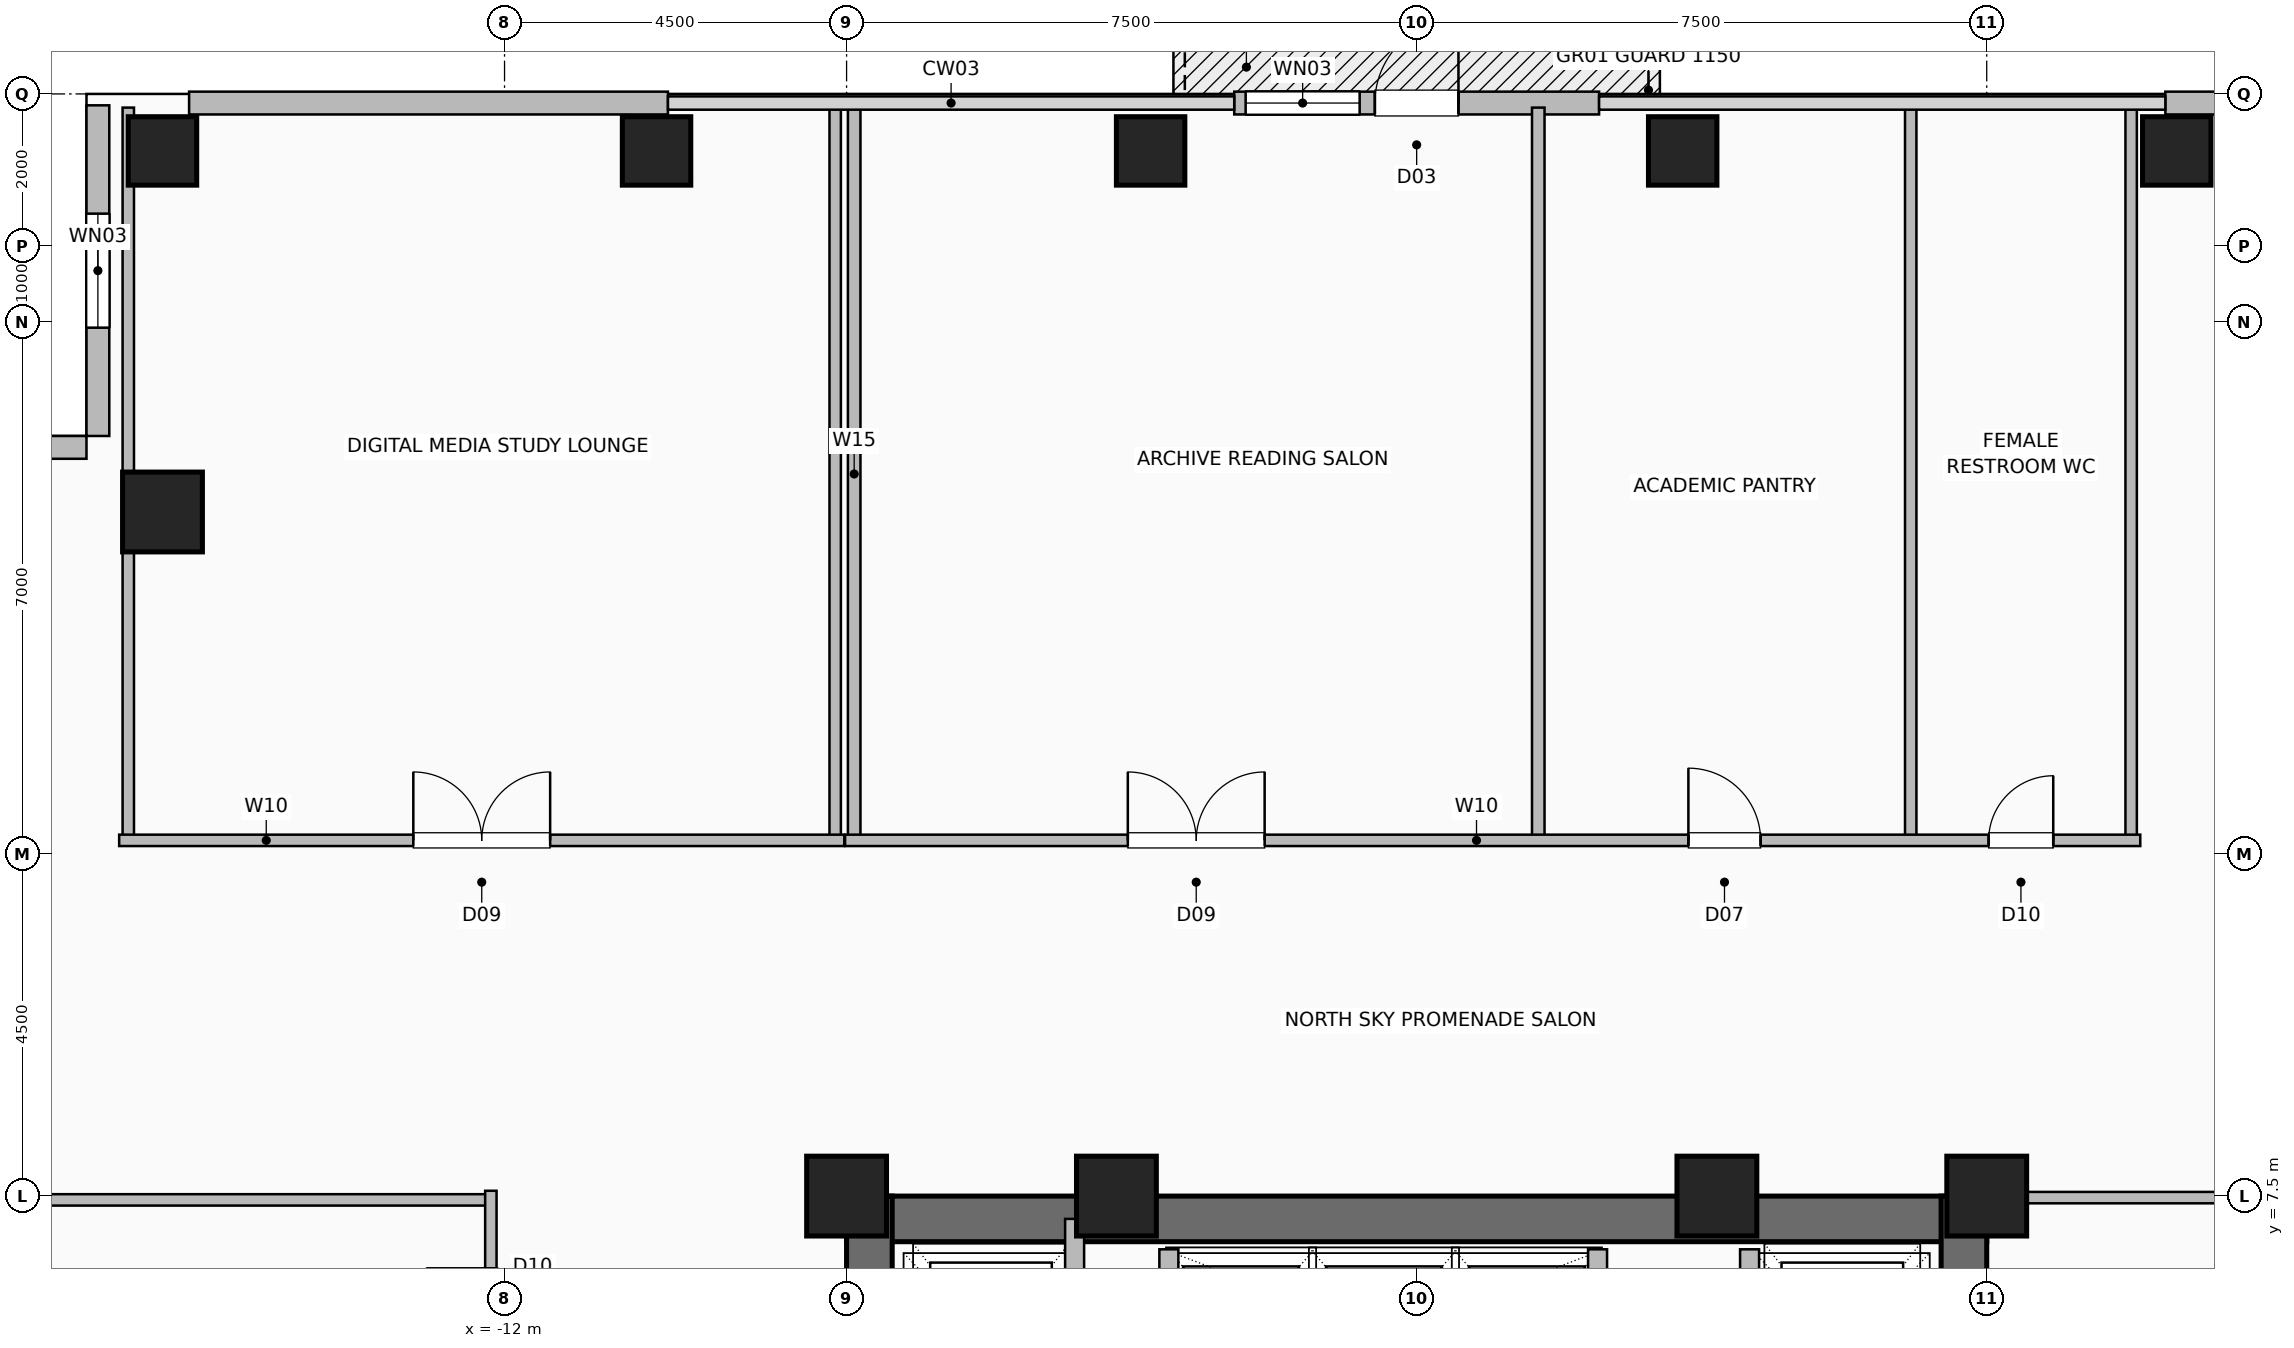
"""IFC4 building model, lengths in metres.
Left out: names, types, materials, properties, quantities, classifications, styles, units other than length and angle.
Written with IfcOpenShell. Run it as: python <this file> out.ifc"""

import sys

from ifc_helpers import new_model, si_unit, direction, frame, frame_2d, origin, origin_2d, place, context, subcontext, project, spatial, rectangle, hollow_rectangle, extrude, element, fill, save


model = new_model("IFC4")
c1 = context("Model", 3, precision=1e-05, world=origin(), true_north=direction((0.0, 1.0)))
c2 = subcontext(c1, "Body", "Model", "MODEL_VIEW")
j1 = project(units=[si_unit("LENGTHUNIT", "METRE"), si_unit("PLANEANGLEUNIT", "RADIAN")], contexts=[c1])
p1 = place(None, origin())
s1 = spatial("IfcSite", under=j1, at=p1, CompositionType="ELEMENT")
p2 = place(p1, origin())
s2 = spatial("IfcBuilding", under=s1, at=p2, CompositionType="ELEMENT")
p3 = place(p2, frame((0.0, 0.0, 133.6)))
s3 = spatial("IfcBuildingStorey", under=s2, at=p3, CompositionType="ELEMENT", Elevation=133.6)
for number, where, z_axis, x_axis in (
    (1, (7.5, 7.5, 0.0), (0.0, 0.0, 1.0), (1.0, 0.0, 0.0)),
    (2, (3.95, 7.5, 0.0), (0.0, 0.0, 1.0), (1.0, 0.0, 0.0)),
    (3, (-3.95, 7.5, 0.0), (0.0, 0.0, 1.0), (1.0, 0.0, 0.0)),
    (4, (-7.5, 7.5, 0.0), (0.0, 0.0, 1.0), (1.0, 0.0, 0.0)),
):
    element("IfcColumn", number, at=place(p3, frame(where, z_axis=z_axis, x_axis=x_axis)), inside=s3, PredefinedType="COLUMN", context=c2, shape_type="SweptSolid", body=[
        extrude(hollow_rectangle(XDim=1.05, YDim=1.05, WallThickness=0.05, at=origin_2d()), origin(), (0.0, 0.0, 1.0), 3.6),
    ])
for number, where, z_axis, x_axis in (
    (5, (-16.5, 21.25, 0.0), (0.0, 0.0, 1.0), (1.0, 0.0, 0.0)),
    (6, (-10.0, 21.25, 0.0), (0.0, 0.0, 1.0), (1.0, 0.0, 0.0)),
    (7, (-3.5, 21.25, 0.0), (0.0, 0.0, 1.0), (1.0, 0.0, 0.0)),
    (8, (3.5, 21.25, 0.0), (0.0, 0.0, 1.0), (1.0, 0.0, 0.0)),
    (9, (10.0, 21.25, 0.0), (0.0, 0.0, 1.0), (1.0, 0.0, 0.0)),
):
    element("IfcColumn", number, at=place(p3, frame(where, z_axis=z_axis, x_axis=x_axis)), inside=s3, PredefinedType="COLUMN", context=c2, shape_type="SweptSolid", body=[
        extrude(hollow_rectangle(XDim=0.9, YDim=0.9, WallThickness=0.045, at=origin_2d()), origin(), (0.0, 0.0, 1.0), 3.6),
    ])
p4 = place(p3, frame((-16.5, 16.5, 0.0), z_axis=(0.0, 0.0, 1.0), x_axis=(1.0, 0.0, 0.0)))
e10 = element("IfcColumn", 10, at=p4, inside=s3, PredefinedType="COLUMN", context=c2, shape_type="SweptSolid", body=[
    extrude(hollow_rectangle(XDim=1.05, YDim=1.05, WallThickness=0.05, at=origin_2d()), origin(), (0.0, 0.0, 1.0), 3.6),
])
for number, where, z_axis, x_axis in (
    (11, (-16.15, 21.88, 0.0), (0.0, 0.0, 1.0), (1.0, 0.0, 0.0)),
    (12, (9.85, 21.88, 0.0), (0.0, 0.0, 1.0), (1.0, 0.0, 0.0)),
):
    element("IfcWall", number, at=place(p3, frame(where, z_axis=z_axis, x_axis=x_axis)), inside=s3, PredefinedType="SOLIDWALL", context=c2, shape_type="SweptSolid", body=[
        extrude(rectangle(XDim=6.3, YDim=0.3, at=frame_2d((3.15, 0.0))), origin(), (0.0, 0.0, 1.0), 3.36),
    ])
p5 = place(p3, frame((-2.4, 21.88, 0.0), z_axis=(0.0, 0.0, 1.0), x_axis=(1.0, 0.0, 0.0)))
e13 = element("IfcWall", 13, at=p5, inside=s3, PredefinedType="SOLIDWALL", context=c2, shape_type="SweptSolid", body=[
    extrude(rectangle(XDim=4.8, YDim=0.3, at=frame_2d((2.4, 0.0))), origin(), (0.0, 0.0, 1.0), 3.36),
])
p6 = place(p5, frame((1.85, 0.0, 0.0)))
e14 = element("IfcOpeningElement", 14, at=p6, cuts=e13, PredefinedType="OPENING", context=c2, shape_type="SweptSolid", body=[
    extrude(rectangle(XDim=1.1, YDim=2.2, at=frame_2d((0.55, 1.1))), frame((0.0, 0.16, 0.0), z_axis=(0.0, -1.0, 0.0), x_axis=(1.0, 0.0, 0.0)), (0.0, 0.0, 1.0), 0.32),
])
p7 = place(p5, frame((0.15, 0.0, 0.85)))
e15 = element("IfcOpeningElement", 15, at=p7, cuts=e13, PredefinedType="OPENING", context=c2, shape_type="SweptSolid", body=[
    extrude(rectangle(XDim=1.5, YDim=1.8, at=frame_2d((0.75, 0.9))), frame((0.0, 0.16, 0.0), z_axis=(0.0, -1.0, 0.0), x_axis=(1.0, 0.0, 0.0)), (0.0, 0.0, 1.0), 0.32),
])
p8 = place(p3, frame((-17.35, 21.85, 0.0), z_axis=(0.0, 0.0, 1.0), x_axis=(0.0, -1.0, 0.0)))
e16 = element("IfcWall", 16, at=p8, inside=s3, PredefinedType="SOLIDWALL", context=c2, shape_type="SweptSolid", body=[
    extrude(rectangle(XDim=4.35, YDim=0.3, at=frame_2d((2.175, 0.0))), origin(), (0.0, 0.0, 1.0), 3.36),
])
p9 = place(p8, frame((1.425, 0.0, 0.9)))
e17 = element("IfcOpeningElement", 17, at=p9, cuts=e16, PredefinedType="OPENING", context=c2, shape_type="SweptSolid", body=[
    extrude(rectangle(XDim=1.5, YDim=1.8, at=frame_2d((0.75, 0.9))), frame((0.0, 0.16, 0.0), z_axis=(0.0, -1.0, 0.0), x_axis=(1.0, 0.0, 0.0)), (0.0, 0.0, 1.0), 0.32),
])
p10 = place(p3, frame((-21.85, 17.35, 0.0), z_axis=(0.0, 0.0, 1.0), x_axis=(1.0, 0.0, 0.0)))
e18 = element("IfcWall", 18, at=p10, inside=s3, PredefinedType="SOLIDWALL", context=c2, shape_type="SweptSolid", body=[
    extrude(rectangle(XDim=4.35, YDim=0.3, at=frame_2d((2.175, 0.0))), origin(), (0.0, 0.0, 1.0), 3.36),
])
p11 = place(p3, frame((-7.5, 7.2, 0.0), z_axis=(0.0, 0.0, 1.0), x_axis=(1.0, 0.0, 0.0)))
e19 = element("IfcWall", 19, at=p11, inside=s3, PredefinedType="SHEAR", context=c2, shape_type="SweptSolid", body=[
    extrude(rectangle(XDim=15.0, YDim=0.6, at=frame_2d((7.5, 0.0))), origin(), (0.0, 0.0, 1.0), 3.36),
])
p12 = place(p3, frame((-7.2, -7.5, 0.0), z_axis=(0.0, 0.0, 1.0), x_axis=(0.0, 1.0, 0.0)))
e20 = element("IfcWall", 20, at=p12, inside=s3, PredefinedType="SHEAR", context=c2, shape_type="SweptSolid", body=[
    extrude(rectangle(XDim=15.0, YDim=0.6, at=frame_2d((7.5, 0.0))), origin(), (0.0, 0.0, 1.0), 3.36),
])
p13 = place(p12, frame((9.5, 0.0, 0.0)))
e21 = element("IfcOpeningElement", 21, at=p13, cuts=e20, PredefinedType="OPENING", context=c2, shape_type="SweptSolid", body=[
    extrude(rectangle(XDim=1.0, YDim=2.08, at=frame_2d((0.5, 1.04))), frame((0.0, 0.31, 0.0), z_axis=(0.0, -1.0, 0.0), x_axis=(1.0, 0.0, 0.0)), (0.0, 0.0, 1.0), 0.62),
])
p14 = place(p3, frame((7.2, -7.5, 0.0), z_axis=(0.0, 0.0, 1.0), x_axis=(0.0, 1.0, 0.0)))
e22 = element("IfcWall", 22, at=p14, inside=s3, PredefinedType="SHEAR", context=c2, shape_type="SweptSolid", body=[
    extrude(rectangle(XDim=15.0, YDim=0.6, at=frame_2d((7.5, 0.0))), origin(), (0.0, 0.0, 1.0), 3.36),
])
for number, where, z_axis, x_axis in (
    (23, (-3.26, 4.58, 0.0), (0.0, 0.0, 1.0), (0.0, 1.0, 0.0)),
    (24, (2.38, 4.58, 0.0), (0.0, 0.0, 1.0), (0.0, 1.0, 0.0)),
):
    element("IfcWall", number, at=place(p3, frame(where, z_axis=z_axis, x_axis=x_axis)), inside=s3, PredefinedType="SHEAR", context=c2, shape_type="SweptSolid", body=[
        extrude(rectangle(XDim=2.22, YDim=0.25, at=frame_2d((1.11, 0.0))), origin(), (0.0, 0.0, 1.0), 3.36),
    ])
p15 = place(p3, frame((-4.5, 4.35, 0.0), z_axis=(0.0, 0.0, 1.0), x_axis=(0.0, 1.0, 0.0)))
e25 = element("IfcWall", 25, at=p15, inside=s3, PredefinedType="SHEAR", context=c2, shape_type="SweptSolid", body=[
    extrude(rectangle(XDim=2.85, YDim=0.25, at=frame_2d((1.425, 0.0))), origin(), (0.0, 0.0, 1.0), 3.36),
])
p16 = place(p3, frame((4.38, 4.3, 0.0), z_axis=(0.0, 0.0, 1.0), x_axis=(0.0, 1.0, 0.0)))
e26 = element("IfcWall", 26, at=p16, inside=s3, PredefinedType="SHEAR", context=c2, shape_type="SweptSolid", body=[
    extrude(rectangle(XDim=2.5, YDim=0.25, at=frame_2d((1.25, 0.0))), origin(), (0.0, 0.0, 1.0), 3.36),
])
p17 = place(p16, frame((0.8, 0.0, 0.0)))
e27 = element("IfcOpeningElement", 27, at=p17, cuts=e26, PredefinedType="OPENING", context=c2, shape_type="SweptSolid", body=[
    extrude(rectangle(XDim=1.2, YDim=2.2, at=frame_2d((0.6, 1.1))), frame((0.0, 0.135, 0.0), z_axis=(0.0, -1.0, 0.0), x_axis=(1.0, 0.0, 0.0)), (0.0, 0.0, 1.0), 0.27),
])
p18 = place(p3, frame((-21.82, 7.45, 0.0), z_axis=(0.0, 0.0, 1.0), x_axis=(1.0, 0.0, 0.0)))
e28 = element("IfcWall", 28, at=p18, inside=s3, PredefinedType="PARTITIONING", context=c2, shape_type="SweptSolid", body=[
    extrude(rectangle(XDim=9.64, YDim=0.15, at=frame_2d((4.82, 0.0))), origin(), (0.0, 0.0, 1.0), 3.36),
])
p19 = place(p3, frame((-12.18, -7.57, 0.0), z_axis=(0.0, 0.0, 1.0), x_axis=(0.0, 1.0, 0.0)))
e29 = element("IfcWall", 29, at=p19, inside=s3, PredefinedType="PARTITIONING", context=c2, shape_type="SweptSolid", body=[
    extrude(rectangle(XDim=15.14, YDim=0.15, at=frame_2d((7.57, 0.0))), origin(), (0.0, 0.0, 1.0), 3.36),
])
p20 = place(p19, frame((2.27, 0.0, 0.0)))
e30 = element("IfcOpeningElement", 30, at=p20, cuts=e29, PredefinedType="OPENING", context=c2, shape_type="SweptSolid", body=[
    extrude(rectangle(XDim=0.95, YDim=2.06, at=frame_2d((0.475, 1.03))), frame((0.0, 0.085, 0.0), z_axis=(0.0, -1.0, 0.0), x_axis=(1.0, 0.0, 0.0)), (0.0, 0.0, 1.0), 0.17),
])
p21 = place(p19, frame((8.395, 0.0, 0.0)))
e31 = element("IfcOpeningElement", 31, at=p21, cuts=e29, PredefinedType="OPENING", context=c2, shape_type="SweptSolid", body=[
    extrude(rectangle(XDim=0.95, YDim=2.06, at=frame_2d((0.475, 1.03))), frame((0.0, 0.085, 0.0), z_axis=(0.0, -1.0, 0.0), x_axis=(1.0, 0.0, 0.0)), (0.0, 0.0, 1.0), 0.17),
])
p22 = place(p19, frame((13.27, 0.0, 0.0)))
e32 = element("IfcOpeningElement", 32, at=p22, cuts=e29, PredefinedType="OPENING", context=c2, shape_type="SweptSolid", body=[
    extrude(rectangle(XDim=0.85, YDim=2.05, at=frame_2d((0.425, 1.025))), frame((0.0, 0.085, 0.0), z_axis=(0.0, -1.0, 0.0), x_axis=(1.0, 0.0, 0.0)), (0.0, 0.0, 1.0), 0.17),
])
for number, where, z_axis, x_axis in (
    (33, (-16.95, 12.18, 0.0), (0.0, 0.0, 1.0), (0.0, 1.0, 0.0)),
    (34, (-7.65, 12.18, 0.0), (0.0, 0.0, 1.0), (0.0, 1.0, 0.0)),
):
    element("IfcWall", number, at=place(p3, frame(where, z_axis=z_axis, x_axis=x_axis)), inside=s3, PredefinedType="PARTITIONING", context=c2, shape_type="SweptSolid", body=[
        extrude(rectangle(XDim=9.64, YDim=0.15, at=frame_2d((4.82, 0.0))), origin(), (0.0, 0.0, 1.0), 3.36),
    ])
p23 = place(p3, frame((-17.07, 12.18, 0.0), z_axis=(0.0, 0.0, 1.0), x_axis=(1.0, 0.0, 0.0)))
e35 = element("IfcWall", 35, at=p23, inside=s3, PredefinedType="PARTITIONING", context=c2, shape_type="SweptSolid", body=[
    extrude(rectangle(XDim=9.54, YDim=0.15, at=frame_2d((4.77, 0.0))), origin(), (0.0, 0.0, 1.0), 3.36),
])
p24 = place(p23, frame((3.87, 0.0, 0.0)))
e36 = element("IfcOpeningElement", 36, at=p24, cuts=e35, PredefinedType="OPENING", context=c2, shape_type="SweptSolid", body=[
    extrude(rectangle(XDim=1.8, YDim=2.08, at=frame_2d((0.9, 1.04))), frame((0.0, 0.085, 0.0), z_axis=(0.0, -1.0, 0.0), x_axis=(1.0, 0.0, 0.0)), (0.0, 0.0, 1.0), 0.17),
])
for number, where, z_axis, x_axis in (
    (37, (-7.4, 12.18, 0.0), (0.0, 0.0, 1.0), (0.0, 1.0, 0.0)),
    (38, (1.6, 12.18, 0.0), (0.0, 0.0, 1.0), (0.0, 1.0, 0.0)),
):
    element("IfcWall", number, at=place(p3, frame(where, z_axis=z_axis, x_axis=x_axis)), inside=s3, PredefinedType="PLUMBINGWALL", context=c2, shape_type="SweptSolid", body=[
        extrude(rectangle(XDim=9.64, YDim=0.165, at=frame_2d((4.82, 0.0))), origin(), (0.0, 0.0, 1.0), 3.36),
    ])
for number, where, z_axis, x_axis in (
    (39, (6.5, 12.18, 0.0), (0.0, 0.0, 1.0), (0.0, 1.0, 0.0)),
    (40, (9.4, 12.18, 0.0), (0.0, 0.0, 1.0), (0.0, 1.0, 0.0)),
):
    element("IfcWall", number, at=place(p3, frame(where, z_axis=z_axis, x_axis=x_axis)), inside=s3, PredefinedType="PARTITIONING", context=c2, shape_type="SweptSolid", body=[
        extrude(rectangle(XDim=9.64, YDim=0.15, at=frame_2d((4.82, 0.0))), origin(), (0.0, 0.0, 1.0), 3.36),
    ])
p25 = place(p3, frame((-7.52, 12.18, 0.0), z_axis=(0.0, 0.0, 1.0), x_axis=(1.0, 0.0, 0.0)))
e41 = element("IfcWall", 41, at=p25, inside=s3, PredefinedType="PARTITIONING", context=c2, shape_type="SweptSolid", body=[
    extrude(rectangle(XDim=17.04, YDim=0.15, at=frame_2d((8.52, 0.0))), origin(), (0.0, 0.0, 1.0), 3.36),
])
p26 = place(p25, frame((3.72, 0.0, 0.0)))
e42 = element("IfcOpeningElement", 42, at=p26, cuts=e41, PredefinedType="OPENING", context=c2, shape_type="SweptSolid", body=[
    extrude(rectangle(XDim=1.8, YDim=2.08, at=frame_2d((0.9, 1.04))), frame((0.0, 0.085, 0.0), z_axis=(0.0, -1.0, 0.0), x_axis=(1.0, 0.0, 0.0)), (0.0, 0.0, 1.0), 0.17),
])
p27 = place(p25, frame((11.095, 0.0, 0.0)))
e43 = element("IfcOpeningElement", 43, at=p27, cuts=e41, PredefinedType="OPENING", context=c2, shape_type="SweptSolid", body=[
    extrude(rectangle(XDim=0.95, YDim=2.06, at=frame_2d((0.475, 1.03))), frame((0.0, 0.085, 0.0), z_axis=(0.0, -1.0, 0.0), x_axis=(1.0, 0.0, 0.0)), (0.0, 0.0, 1.0), 0.17),
])
p28 = place(p25, frame((15.045, 0.0, 0.0)))
e44 = element("IfcOpeningElement", 44, at=p28, cuts=e41, PredefinedType="OPENING", context=c2, shape_type="SweptSolid", body=[
    extrude(rectangle(XDim=0.85, YDim=2.05, at=frame_2d((0.425, 1.025))), frame((0.0, 0.085, 0.0), z_axis=(0.0, -1.0, 0.0), x_axis=(1.0, 0.0, 0.0)), (0.0, 0.0, 1.0), 0.17),
])
p29 = place(p3, frame((7.6, 7.48, 0.0), z_axis=(0.0, 0.0, 1.0), x_axis=(1.0, 0.0, 0.0)))
e45 = element("IfcWall", 45, at=p29, inside=s3, PredefinedType="PARTITIONING", context=c2, shape_type="SweptSolid", body=[
    extrude(rectangle(XDim=14.22, YDim=0.15, at=frame_2d((7.11, 0.0))), origin(), (0.0, 0.0, 1.0), 3.36),
])
p30 = place(p6, origin())
e46 = element("IfcDoor", 46, at=p30, inside=s3, OperationType="SINGLE_SWING_RIGHT", PredefinedType="DOOR", context=c2, shape_type="SweptSolid", body=[
    extrude(rectangle(XDim=1.1, YDim=2.2, at=frame_2d((0.55, 1.1))), frame((0.0, 0.025, 0.0), z_axis=(0.0, -1.0, 0.0), x_axis=(1.0, 0.0, 0.0)), (0.0, 0.0, 1.0), 0.05),
])
fill(e14, e46)
p31 = place(p7, origin())
e47 = element("IfcWindow", 47, at=p31, inside=s3, PartitioningType="SINGLE_PANEL", PredefinedType="WINDOW", context=c2, shape_type="SweptSolid", body=[
    extrude(rectangle(XDim=1.5, YDim=1.8, at=frame_2d((0.75, 0.9))), frame((0.0, 0.03, 0.0), z_axis=(0.0, -1.0, 0.0), x_axis=(1.0, 0.0, 0.0)), (0.0, 0.0, 1.0), 0.06),
])
fill(e15, e47)
p32 = place(p9, origin())
e48 = element("IfcWindow", 48, at=p32, inside=s3, PartitioningType="SINGLE_PANEL", PredefinedType="WINDOW", context=c2, shape_type="SweptSolid", body=[
    extrude(rectangle(XDim=1.5, YDim=1.8, at=frame_2d((0.75, 0.9))), frame((0.0, 0.03, 0.0), z_axis=(0.0, -1.0, 0.0), x_axis=(1.0, 0.0, 0.0)), (0.0, 0.0, 1.0), 0.06),
])
fill(e17, e48)
p33 = place(p24, origin())
e49 = element("IfcDoor", 49, at=p33, inside=s3, OperationType="DOUBLE_DOOR_SINGLE_SWING", PredefinedType="DOOR", context=c2, shape_type="SweptSolid", body=[
    extrude(rectangle(XDim=1.8, YDim=2.08, at=frame_2d((0.9, 1.04))), frame((0.0, 0.025, 0.0), z_axis=(0.0, -1.0, 0.0), x_axis=(1.0, 0.0, 0.0)), (0.0, 0.0, 1.0), 0.05),
])
fill(e36, e49)
p34 = place(p26, origin())
e50 = element("IfcDoor", 50, at=p34, inside=s3, OperationType="DOUBLE_DOOR_SINGLE_SWING", PredefinedType="DOOR", context=c2, shape_type="SweptSolid", body=[
    extrude(rectangle(XDim=1.8, YDim=2.08, at=frame_2d((0.9, 1.04))), frame((0.0, 0.025, 0.0), z_axis=(0.0, -1.0, 0.0), x_axis=(1.0, 0.0, 0.0)), (0.0, 0.0, 1.0), 0.05),
])
fill(e42, e50)
p35 = place(p27, origin())
e51 = element("IfcDoor", 51, at=p35, inside=s3, OperationType="SINGLE_SWING_LEFT", PredefinedType="DOOR", context=c2, shape_type="SweptSolid", body=[
    extrude(rectangle(XDim=0.95, YDim=2.06, at=frame_2d((0.475, 1.03))), frame((0.0, 0.025, 0.0), z_axis=(0.0, -1.0, 0.0), x_axis=(1.0, 0.0, 0.0)), (0.0, 0.0, 1.0), 0.05),
])
fill(e43, e51)
p36 = place(p28, origin())
e52 = element("IfcDoor", 52, at=p36, inside=s3, OperationType="SINGLE_SWING_RIGHT", PredefinedType="DOOR", context=c2, shape_type="SweptSolid", body=[
    extrude(rectangle(XDim=0.85, YDim=2.05, at=frame_2d((0.425, 1.025))), frame((0.0, 0.025, 0.0), z_axis=(0.0, -1.0, 0.0), x_axis=(1.0, 0.0, 0.0)), (0.0, 0.0, 1.0), 0.05),
])
fill(e44, e52)
save(model, sys.argv[1])
